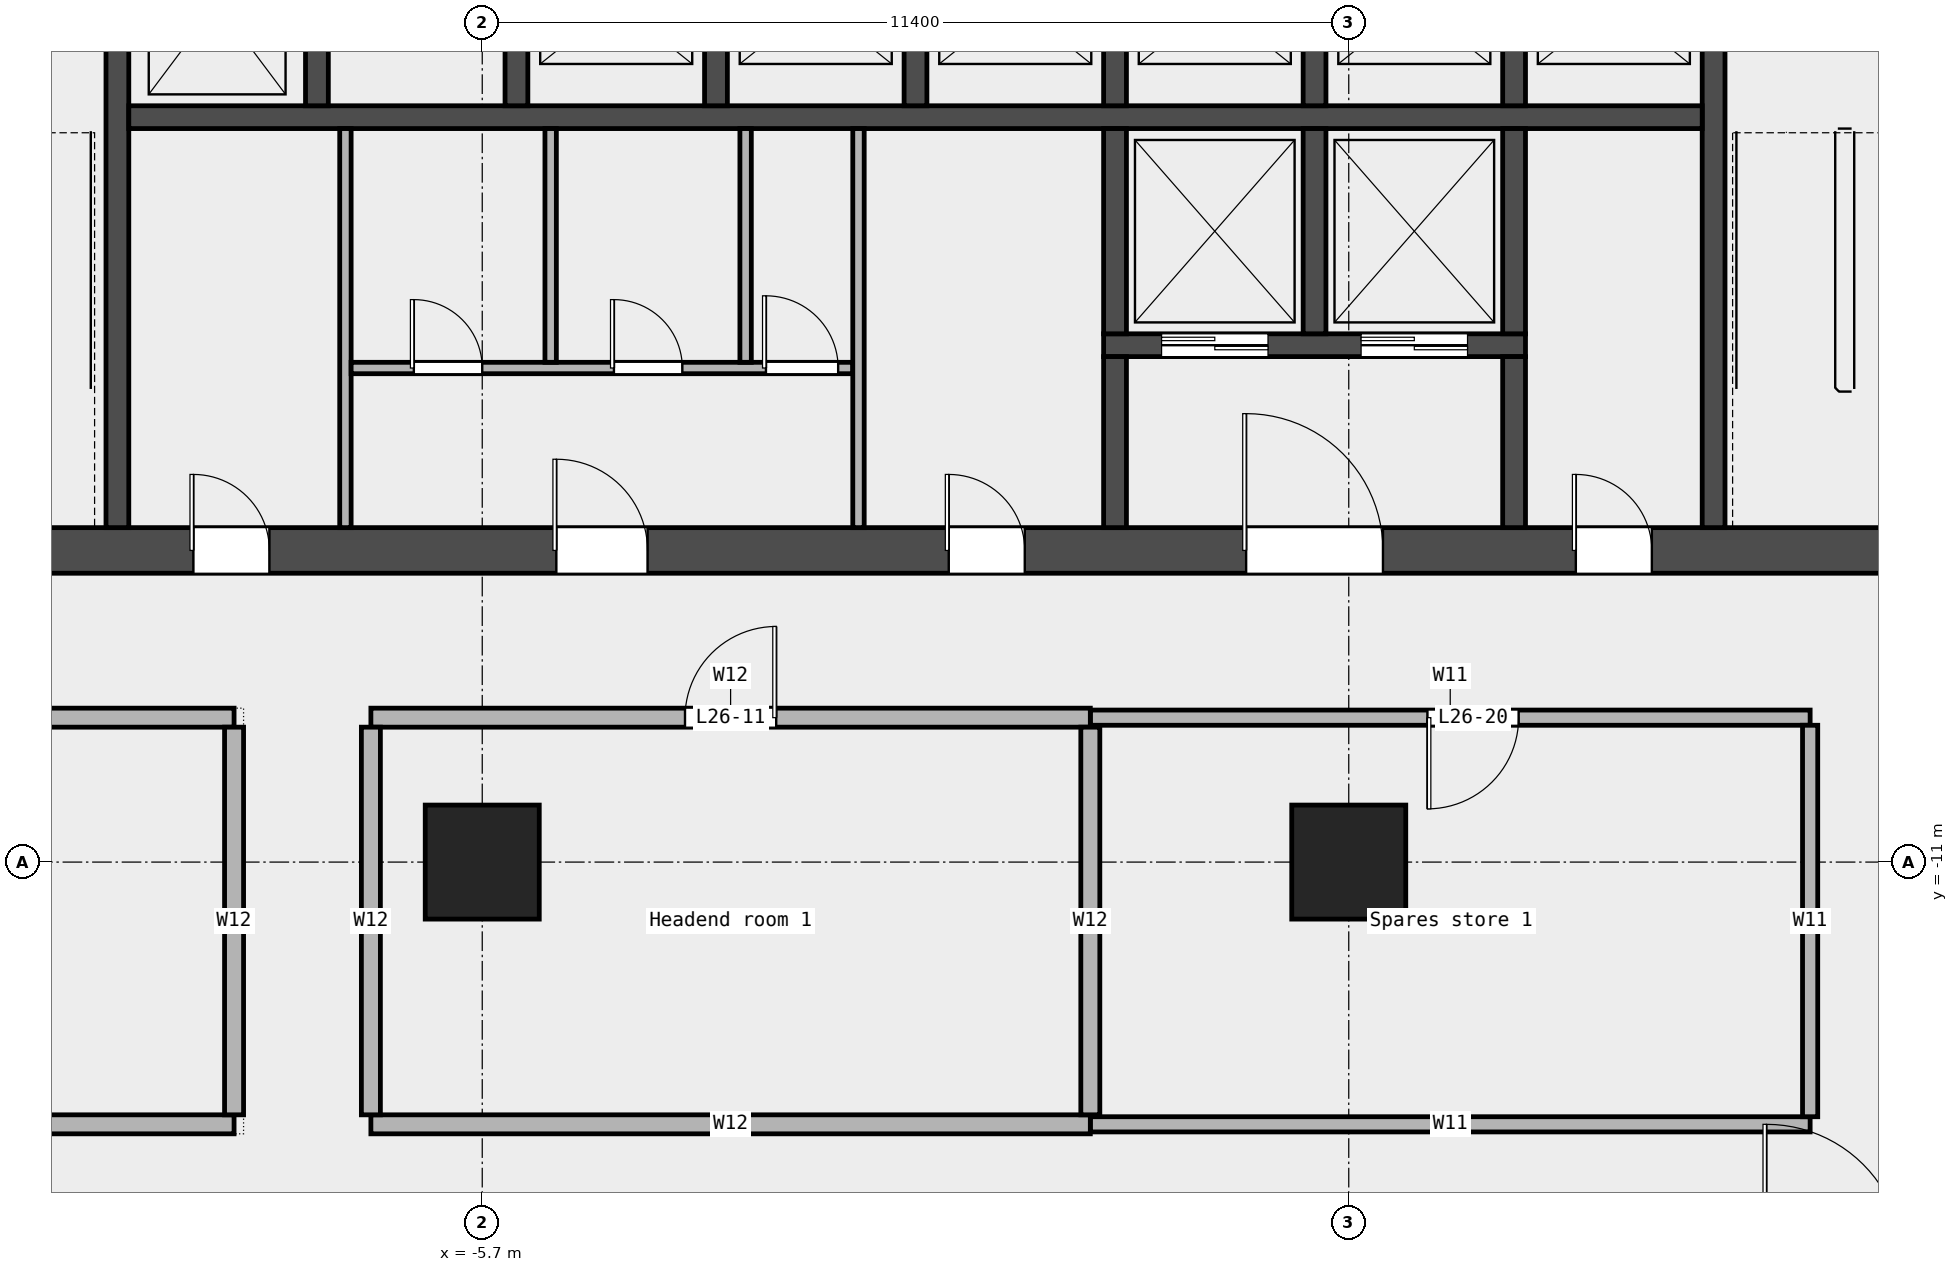
"""IFC4 building model, lengths in metres.
Left out: names, types, materials, properties, quantities, classifications, styles, units other than length and angle.
Written with IfcOpenShell. Run it as: python <this file> out.ifc"""

import sys

from ifc_helpers import new_model, si_unit, direction, frame, frame_2d, origin, origin_2d, place, context, subcontext, project, spatial, rectangle, extrude, element, fill, save


model = new_model("IFC4")
c1 = context("Model", 3, precision=1e-05, world=origin(), true_north=direction((0.0, 1.0)))
c2 = subcontext(c1, "Body", "Model", "MODEL_VIEW")
j1 = project(units=[si_unit("LENGTHUNIT", "METRE"), si_unit("PLANEANGLEUNIT", "RADIAN")], contexts=[c1])
p1 = place(None, origin())
s1 = spatial("IfcSite", under=j1, at=p1, CompositionType="ELEMENT")
p2 = place(p1, origin())
s2 = spatial("IfcBuilding", under=s1, at=p2, CompositionType="ELEMENT")
p3 = place(p2, frame((0.0, 0.0, 130.6)))
s3 = spatial("IfcBuildingStorey", under=s2, at=p3, CompositionType="ELEMENT", Elevation=130.6)
for number, where, z_axis, x_axis in (
    (1, (-5.7, -11.0, 0.0), (0.0, 0.0, 1.0), (1.0, 0.0, 0.0)),
    (2, (5.7, -11.0, 0.0), (0.0, 0.0, 1.0), (1.0, 0.0, 0.0)),
):
    element("IfcColumn", number, at=place(p3, frame(where, z_axis=z_axis, x_axis=x_axis)), inside=s3, PredefinedType="COLUMN", context=c2, shape_type="SweptSolid", body=[
        extrude(rectangle(XDim=1.5, YDim=1.5, at=origin_2d()), origin(), (0.0, 0.0, 1.0), 4.05),
    ])
p4 = place(p3, frame((2.3, -14.45, 0.0), z_axis=(0.0, 0.0, 1.0), x_axis=(1.0, 0.0, 0.0)))
e3 = element("IfcWall", 3, at=p4, inside=s3, PredefinedType="PARTITIONING", context=c2, shape_type="SweptSolid", body=[
    extrude(rectangle(XDim=9.47, YDim=0.2, at=frame_2d((4.735, 0.0))), origin(), (0.0, 0.0, 1.0), 4.05),
])
p5 = place(p3, frame((-15.9, -14.45, 0.0), z_axis=(0.0, 0.0, 1.0), x_axis=(1.0, 0.0, 0.0)))
e4 = element("IfcWall", 4, at=p5, inside=s3, PredefinedType="PARTITIONING", context=c2, shape_type="SweptSolid", body=[
    extrude(rectangle(XDim=6.935, YDim=0.25, at=frame_2d((3.467, 0.0))), origin(), (0.0, 0.0, 1.0), 4.05),
])
p6 = place(p3, frame((-7.165, -14.45, 0.0), z_axis=(0.0, 0.0, 1.0), x_axis=(1.0, 0.0, 0.0)))
e5 = element("IfcWall", 5, at=p6, inside=s3, PredefinedType="PARTITIONING", context=c2, shape_type="SweptSolid", body=[
    extrude(rectangle(XDim=9.465, YDim=0.25, at=frame_2d((4.732, 0.0))), origin(), (0.0, 0.0, 1.0), 4.05),
])
p7 = place(p3, frame((2.3, -9.1, 0.0), z_axis=(0.0, 0.0, 1.0), x_axis=(1.0, 0.0, 0.0)))
e6 = element("IfcWall", 6, at=p7, inside=s3, PredefinedType="PARTITIONING", context=c2, shape_type="SweptSolid", body=[
    extrude(rectangle(XDim=9.47, YDim=0.2, at=frame_2d((4.735, 0.0))), origin(), (0.0, 0.0, 1.0), 4.05),
])
p8 = place(p7, frame((4.435, 0.0, 0.0)))
e7 = element("IfcOpeningElement", 7, at=p8, cuts=e6, PredefinedType="OPENING", context=c2, shape_type="SweptSolid", body=[
    extrude(rectangle(XDim=1.2, YDim=2.1, at=frame_2d((0.6, 1.05))), frame((0.0, 0.112, 0.0), z_axis=(0.0, -1.0, 0.0), x_axis=(1.0, 0.0, 0.0)), (0.0, 0.0, 1.0), 0.224),
])
p9 = place(p3, frame((-15.9, -9.1, 0.0), z_axis=(0.0, 0.0, 1.0), x_axis=(1.0, 0.0, 0.0)))
e8 = element("IfcWall", 8, at=p9, inside=s3, PredefinedType="PARTITIONING", context=c2, shape_type="SweptSolid", body=[
    extrude(rectangle(XDim=6.935, YDim=0.25, at=frame_2d((3.467, 0.0))), origin(), (0.0, 0.0, 1.0), 4.05),
])
p10 = place(p9, frame((3.018, 0.0, 0.0)))
e9 = element("IfcOpeningElement", 9, at=p10, cuts=e8, PredefinedType="OPENING", context=c2, shape_type="SweptSolid", body=[
    extrude(rectangle(XDim=0.9, YDim=2.1, at=frame_2d((0.45, 1.05))), frame((0.0, 0.137, 0.0), z_axis=(0.0, -1.0, 0.0), x_axis=(1.0, 0.0, 0.0)), (0.0, 0.0, 1.0), 0.274),
])
p11 = place(p3, frame((-7.165, -9.1, 0.0), z_axis=(0.0, 0.0, 1.0), x_axis=(1.0, 0.0, 0.0)))
e10 = element("IfcWall", 10, at=p11, inside=s3, PredefinedType="PARTITIONING", context=c2, shape_type="SweptSolid", body=[
    extrude(rectangle(XDim=9.465, YDim=0.25, at=frame_2d((4.732, 0.0))), origin(), (0.0, 0.0, 1.0), 4.05),
])
p12 = place(p11, frame((4.133, 0.0, 0.0)))
e11 = element("IfcOpeningElement", 11, at=p12, cuts=e10, PredefinedType="OPENING", context=c2, shape_type="SweptSolid", body=[
    extrude(rectangle(XDim=1.2, YDim=2.1, at=frame_2d((0.6, 1.05))), frame((0.0, 0.137, 0.0), z_axis=(0.0, -1.0, 0.0), x_axis=(1.0, 0.0, 0.0)), (0.0, 0.0, 1.0), 0.274),
])
for number, where, z_axis, x_axis in (
    (12, (-8.965, -14.325, 0.0), (0.0, 0.0, 1.0), (0.0, 1.0, 0.0)),
    (13, (-7.165, -14.325, 0.0), (0.0, 0.0, 1.0), (0.0, 1.0, 0.0)),
    (14, (2.3, -14.325, 0.0), (0.0, 0.0, 1.0), (0.0, 1.0, 0.0)),
):
    element("IfcWall", number, at=place(p3, frame(where, z_axis=z_axis, x_axis=x_axis)), inside=s3, PredefinedType="PARTITIONING", context=c2, shape_type="SweptSolid", body=[
        extrude(rectangle(XDim=5.1, YDim=0.25, at=frame_2d((2.55, 0.0))), origin(), (0.0, 0.0, 1.0), 4.05),
    ])
p13 = place(p3, frame((11.77, -14.35, 0.0), z_axis=(0.0, 0.0, 1.0), x_axis=(0.0, 1.0, 0.0)))
e15 = element("IfcWall", 15, at=p13, inside=s3, PredefinedType="PARTITIONING", context=c2, shape_type="SweptSolid", body=[
    extrude(rectangle(XDim=5.15, YDim=0.2, at=frame_2d((2.575, 0.0))), origin(), (0.0, 0.0, 1.0), 4.05),
])
p14 = place(p3, frame((-14.4, -6.9, 0.0), z_axis=(0.0, 0.0, 1.0), x_axis=(1.0, 0.0, 0.0)))
e16 = element("IfcWall", 16, at=p14, inside=s3, PredefinedType="SHEAR", context=c2, shape_type="SweptSolid", body=[
    extrude(rectangle(XDim=28.8, YDim=0.6, at=frame_2d((14.4, 0.0))), origin(), (0.0, 0.0, 1.0), 4.2),
])
p15 = place(p14, frame((4.9, 0.0, 0.0)))
e17 = element("IfcOpeningElement", 17, at=p15, cuts=e16, PredefinedType="OPENING", context=c2, shape_type="SweptSolid", body=[
    extrude(rectangle(XDim=1.0, YDim=2.1, at=frame_2d((0.5, 1.05))), frame((0.0, 0.312, 0.0), z_axis=(0.0, -1.0, 0.0), x_axis=(1.0, 0.0, 0.0)), (0.0, 0.0, 1.0), 0.624),
])
p16 = place(p14, frame((9.675, 0.0, 0.0)))
e18 = element("IfcOpeningElement", 18, at=p16, cuts=e16, PredefinedType="OPENING", context=c2, shape_type="SweptSolid", body=[
    extrude(rectangle(XDim=1.2, YDim=2.1, at=frame_2d((0.6, 1.05))), frame((0.0, 0.312, 0.0), z_axis=(0.0, -1.0, 0.0), x_axis=(1.0, 0.0, 0.0)), (0.0, 0.0, 1.0), 0.624),
])
p17 = place(p14, frame((14.837, 0.0, 0.0)))
e19 = element("IfcOpeningElement", 19, at=p17, cuts=e16, PredefinedType="OPENING", context=c2, shape_type="SweptSolid", body=[
    extrude(rectangle(XDim=1.0, YDim=2.1, at=frame_2d((0.5, 1.05))), frame((0.0, 0.312, 0.0), z_axis=(0.0, -1.0, 0.0), x_axis=(1.0, 0.0, 0.0)), (0.0, 0.0, 1.0), 0.624),
])
p18 = place(p14, frame((18.75, 0.0, 0.0)))
e20 = element("IfcOpeningElement", 20, at=p18, cuts=e16, PredefinedType="OPENING", context=c2, shape_type="SweptSolid", body=[
    extrude(rectangle(XDim=1.8, YDim=2.1, at=frame_2d((0.9, 1.05))), frame((0.0, 0.312, 0.0), z_axis=(0.0, -1.0, 0.0), x_axis=(1.0, 0.0, 0.0)), (0.0, 0.0, 1.0), 0.624),
])
p19 = place(p14, frame((23.087, 0.0, 0.0)))
e21 = element("IfcOpeningElement", 21, at=p19, cuts=e16, PredefinedType="OPENING", context=c2, shape_type="SweptSolid", body=[
    extrude(rectangle(XDim=1.0, YDim=2.1, at=frame_2d((0.5, 1.05))), frame((0.0, 0.312, 0.0), z_axis=(0.0, -1.0, 0.0), x_axis=(1.0, 0.0, 0.0)), (0.0, 0.0, 1.0), 0.624),
])
for number, where, z_axis, x_axis in (
    (22, (-10.5, -6.6, 0.0), (0.0, 0.0, 1.0), (0.0, 1.0, 0.0)),
    (23, (10.5, -6.6, 0.0), (0.0, 0.0, 1.0), (0.0, 1.0, 0.0)),
):
    element("IfcWall", number, at=place(p3, frame(where, z_axis=z_axis, x_axis=x_axis)), inside=s3, PredefinedType="SHEAR", context=c2, shape_type="SweptSolid", body=[
        extrude(rectangle(XDim=8.55, YDim=0.3, at=frame_2d((4.275, 0.0))), origin(), (0.0, 0.0, 1.0), 4.2),
    ])
p20 = place(p3, frame((-10.35, -1.2, 0.0), z_axis=(0.0, 0.0, 1.0), x_axis=(1.0, 0.0, 0.0)))
e24 = element("IfcWall", 24, at=p20, inside=s3, PredefinedType="SOLIDWALL", context=c2, shape_type="SweptSolid", body=[
    extrude(rectangle(XDim=20.7, YDim=0.3, at=frame_2d((10.35, 0.0))), origin(), (0.0, 0.0, 1.0), 4.2),
])
for number, where, z_axis, x_axis in (
    (25, (-7.875, -1.05, 0.0), (0.0, 0.0, 1.0), (0.0, 1.0, 0.0)),
    (26, (-5.25, -1.05, 0.0), (0.0, 0.0, 1.0), (0.0, 1.0, 0.0)),
    (27, (-2.625, -1.05, 0.0), (0.0, 0.0, 1.0), (0.0, 1.0, 0.0)),
    (28, (0.0, -1.05, 0.0), (0.0, 0.0, 1.0), (0.0, 1.0, 0.0)),
    (29, (2.625, -1.05, 0.0), (0.0, 0.0, 1.0), (0.0, 1.0, 0.0)),
    (30, (5.25, -1.05, 0.0), (0.0, 0.0, 1.0), (0.0, 1.0, 0.0)),
    (31, (7.875, -1.05, 0.0), (0.0, 0.0, 1.0), (0.0, 1.0, 0.0)),
):
    element("IfcWall", number, at=place(p3, frame(where, z_axis=z_axis, x_axis=x_axis)), inside=s3, PredefinedType="SOLIDWALL", context=c2, shape_type="SweptSolid", body=[
        extrude(rectangle(XDim=2.7, YDim=0.3, at=frame_2d((1.35, 0.0))), origin(), (0.0, 0.0, 1.0), 4.2),
    ])
p21 = place(p3, frame((2.475, -4.2, 0.0), z_axis=(0.0, 0.0, 1.0), x_axis=(1.0, 0.0, 0.0)))
e32 = element("IfcWall", 32, at=p21, inside=s3, PredefinedType="SOLIDWALL", context=c2, shape_type="SweptSolid", body=[
    extrude(rectangle(XDim=5.55, YDim=0.3, at=frame_2d((2.775, 0.0))), origin(), (0.0, 0.0, 1.0), 4.2),
])
p22 = place(p21, frame((0.762, 0.0, 0.0)))
e33 = element("IfcOpeningElement", 33, at=p22, cuts=e32, PredefinedType="OPENING", context=c2, shape_type="SweptSolid", body=[
    extrude(rectangle(XDim=1.4, YDim=2.1, at=frame_2d((0.7, 1.05))), frame((0.0, 0.162, 0.0), z_axis=(0.0, -1.0, 0.0), x_axis=(1.0, 0.0, 0.0)), (0.0, 0.0, 1.0), 0.324),
])
p23 = place(p21, frame((3.387, 0.0, 0.0)))
e34 = element("IfcOpeningElement", 34, at=p23, cuts=e32, PredefinedType="OPENING", context=c2, shape_type="SweptSolid", body=[
    extrude(rectangle(XDim=1.4, YDim=2.1, at=frame_2d((0.7, 1.05))), frame((0.0, 0.162, 0.0), z_axis=(0.0, -1.0, 0.0), x_axis=(1.0, 0.0, 0.0)), (0.0, 0.0, 1.0), 0.324),
])
p24 = place(p3, frame((2.625, -4.05, 0.0), z_axis=(0.0, 0.0, 1.0), x_axis=(0.0, 1.0, 0.0)))
e35 = element("IfcWall", 35, at=p24, inside=s3, PredefinedType="SOLIDWALL", context=c2, shape_type="SweptSolid", body=[
    extrude(rectangle(XDim=2.7, YDim=0.3, at=frame_2d((1.35, 0.0))), origin(), (0.0, 0.0, 1.0), 4.2),
])
p25 = place(p3, frame((2.625, -6.6, 0.0), z_axis=(0.0, 0.0, 1.0), x_axis=(0.0, 1.0, 0.0)))
e36 = element("IfcWall", 36, at=p25, inside=s3, PredefinedType="SOLIDWALL", context=c2, shape_type="SweptSolid", body=[
    extrude(rectangle(XDim=2.25, YDim=0.3, at=frame_2d((1.125, 0.0))), origin(), (0.0, 0.0, 1.0), 4.2),
])
for number, where, z_axis, x_axis in (
    (37, (5.25, -4.05, 0.0), (0.0, 0.0, 1.0), (0.0, 1.0, 0.0)),
    (38, (7.875, -4.05, 0.0), (0.0, 0.0, 1.0), (0.0, 1.0, 0.0)),
):
    element("IfcWall", number, at=place(p3, frame(where, z_axis=z_axis, x_axis=x_axis)), inside=s3, PredefinedType="SOLIDWALL", context=c2, shape_type="SweptSolid", body=[
        extrude(rectangle(XDim=2.7, YDim=0.3, at=frame_2d((1.35, 0.0))), origin(), (0.0, 0.0, 1.0), 4.2),
    ])
p26 = place(p3, frame((7.875, -6.6, 0.0), z_axis=(0.0, 0.0, 1.0), x_axis=(0.0, 1.0, 0.0)))
e39 = element("IfcWall", 39, at=p26, inside=s3, PredefinedType="SOLIDWALL", context=c2, shape_type="SweptSolid", body=[
    extrude(rectangle(XDim=2.25, YDim=0.3, at=frame_2d((1.125, 0.0))), origin(), (0.0, 0.0, 1.0), 4.2),
])
p27 = place(p3, frame((-7.5, -6.6, 0.0), z_axis=(0.0, 0.0, 1.0), x_axis=(0.0, 1.0, 0.0)))
e40 = element("IfcWall", 40, at=p27, inside=s3, PredefinedType="PARTITIONING", context=c2, shape_type="SweptSolid", body=[
    extrude(rectangle(XDim=5.25, YDim=0.15, at=frame_2d((2.625, 0.0))), origin(), (0.0, 0.0, 1.0), 4.2),
])
p28 = place(p3, frame((-7.425, -4.5, 0.0), z_axis=(0.0, 0.0, 1.0), x_axis=(1.0, 0.0, 0.0)))
e41 = element("IfcWall", 41, at=p28, inside=s3, PredefinedType="PARTITIONING", context=c2, shape_type="SweptSolid", body=[
    extrude(rectangle(XDim=6.6, YDim=0.15, at=frame_2d((3.3, 0.0))), origin(), (0.0, 0.0, 1.0), 4.2),
])
p29 = place(p28, frame((0.825, 0.0, 0.0)))
e42 = element("IfcOpeningElement", 42, at=p29, cuts=e41, PredefinedType="OPENING", context=c2, shape_type="SweptSolid", body=[
    extrude(rectangle(XDim=0.9, YDim=2.1, at=frame_2d((0.45, 1.05))), frame((0.0, 0.087, 0.0), z_axis=(0.0, -1.0, 0.0), x_axis=(1.0, 0.0, 0.0)), (0.0, 0.0, 1.0), 0.174),
])
p30 = place(p28, frame((3.458, 0.0, 0.0)))
e43 = element("IfcOpeningElement", 43, at=p30, cuts=e41, PredefinedType="OPENING", context=c2, shape_type="SweptSolid", body=[
    extrude(rectangle(XDim=0.9, YDim=2.1, at=frame_2d((0.45, 1.05))), frame((0.0, 0.087, 0.0), z_axis=(0.0, -1.0, 0.0), x_axis=(1.0, 0.0, 0.0)), (0.0, 0.0, 1.0), 0.174),
])
p31 = place(p28, frame((5.458, 0.0, 0.0)))
e44 = element("IfcOpeningElement", 44, at=p31, cuts=e41, PredefinedType="OPENING", context=c2, shape_type="SweptSolid", body=[
    extrude(rectangle(XDim=0.95, YDim=2.1, at=frame_2d((0.475, 1.05))), frame((0.0, 0.087, 0.0), z_axis=(0.0, -1.0, 0.0), x_axis=(1.0, 0.0, 0.0)), (0.0, 0.0, 1.0), 0.174),
])
for number, where, z_axis, x_axis in (
    (45, (-4.8, -4.425, 0.0), (0.0, 0.0, 1.0), (0.0, 1.0, 0.0)),
    (46, (-2.235, -4.425, 0.0), (0.0, 0.0, 1.0), (0.0, 1.0, 0.0)),
):
    element("IfcWall", number, at=place(p3, frame(where, z_axis=z_axis, x_axis=x_axis)), inside=s3, PredefinedType="PARTITIONING", context=c2, shape_type="SweptSolid", body=[
        extrude(rectangle(XDim=3.075, YDim=0.15, at=frame_2d((1.538, 0.0))), origin(), (0.0, 0.0, 1.0), 4.2),
    ])
p32 = place(p3, frame((-0.75, -6.6, 0.0), z_axis=(0.0, 0.0, 1.0), x_axis=(0.0, 1.0, 0.0)))
e47 = element("IfcWall", 47, at=p32, inside=s3, PredefinedType="PARTITIONING", context=c2, shape_type="SweptSolid", body=[
    extrude(rectangle(XDim=5.25, YDim=0.15, at=frame_2d((2.625, 0.0))), origin(), (0.0, 0.0, 1.0), 4.2),
])
p33 = place(p12, origin())
e48 = element("IfcDoor", 48, at=p33, inside=s3, OperationType="SINGLE_SWING_RIGHT", PredefinedType="DOOR", context=c2, shape_type="SweptSolid", body=[
    extrude(rectangle(XDim=1.2, YDim=2.1, at=frame_2d((0.6, 1.05))), frame((0.0, 0.025, 0.0), z_axis=(0.0, -1.0, 0.0), x_axis=(1.0, 0.0, 0.0)), (0.0, 0.0, 1.0), 0.05),
])
fill(e11, e48)
p34 = place(p8, origin())
e49 = element("IfcDoor", 49, at=p34, inside=s3, OperationType="SINGLE_SWING_RIGHT", PredefinedType="DOOR", context=c2, shape_type="SweptSolid", body=[
    extrude(rectangle(XDim=1.2, YDim=2.1, at=frame_2d((0.6, 1.05))), frame((0.0, 0.025, 0.0), z_axis=(0.0, -1.0, 0.0), x_axis=(1.0, 0.0, 0.0)), (0.0, 0.0, 1.0), 0.05),
])
fill(e7, e49)
p35 = place(p22, origin())
e50 = element("IfcDoor", 50, at=p35, inside=s3, OperationType="DOUBLE_DOOR_SLIDING", PredefinedType="DOOR", context=c2, shape_type="SweptSolid", body=[
    extrude(rectangle(XDim=1.4, YDim=2.1, at=frame_2d((0.7, 1.05))), frame((0.0, 0.025, 0.0), z_axis=(0.0, -1.0, 0.0), x_axis=(1.0, 0.0, 0.0)), (0.0, 0.0, 1.0), 0.05),
])
fill(e33, e50)
p36 = place(p23, origin())
e51 = element("IfcDoor", 51, at=p36, inside=s3, OperationType="DOUBLE_DOOR_SLIDING", PredefinedType="DOOR", context=c2, shape_type="SweptSolid", body=[
    extrude(rectangle(XDim=1.4, YDim=2.1, at=frame_2d((0.7, 1.05))), frame((0.0, 0.025, 0.0), z_axis=(0.0, -1.0, 0.0), x_axis=(1.0, 0.0, 0.0)), (0.0, 0.0, 1.0), 0.05),
])
fill(e34, e51)
p37 = place(p15, origin())
e52 = element("IfcDoor", 52, at=p37, inside=s3, OperationType="SINGLE_SWING_LEFT", PredefinedType="DOOR", context=c2, shape_type="SweptSolid", body=[
    extrude(rectangle(XDim=1.0, YDim=2.1, at=frame_2d((0.5, 1.05))), frame((0.0, 0.025, 0.0), z_axis=(0.0, -1.0, 0.0), x_axis=(1.0, 0.0, 0.0)), (0.0, 0.0, 1.0), 0.05),
])
fill(e17, e52)
p38 = place(p16, origin())
e53 = element("IfcDoor", 53, at=p38, inside=s3, OperationType="SINGLE_SWING_LEFT", PredefinedType="DOOR", context=c2, shape_type="SweptSolid", body=[
    extrude(rectangle(XDim=1.2, YDim=2.1, at=frame_2d((0.6, 1.05))), frame((0.0, 0.025, 0.0), z_axis=(0.0, -1.0, 0.0), x_axis=(1.0, 0.0, 0.0)), (0.0, 0.0, 1.0), 0.05),
])
fill(e18, e53)
p39 = place(p29, origin())
e54 = element("IfcDoor", 54, at=p39, inside=s3, OperationType="SINGLE_SWING_LEFT", PredefinedType="DOOR", context=c2, shape_type="SweptSolid", body=[
    extrude(rectangle(XDim=0.9, YDim=2.1, at=frame_2d((0.45, 1.05))), frame((0.0, 0.025, 0.0), z_axis=(0.0, -1.0, 0.0), x_axis=(1.0, 0.0, 0.0)), (0.0, 0.0, 1.0), 0.05),
])
fill(e42, e54)
p40 = place(p30, origin())
e55 = element("IfcDoor", 55, at=p40, inside=s3, OperationType="SINGLE_SWING_LEFT", PredefinedType="DOOR", context=c2, shape_type="SweptSolid", body=[
    extrude(rectangle(XDim=0.9, YDim=2.1, at=frame_2d((0.45, 1.05))), frame((0.0, 0.025, 0.0), z_axis=(0.0, -1.0, 0.0), x_axis=(1.0, 0.0, 0.0)), (0.0, 0.0, 1.0), 0.05),
])
fill(e43, e55)
p41 = place(p31, origin())
e56 = element("IfcDoor", 56, at=p41, inside=s3, OperationType="SINGLE_SWING_LEFT", PredefinedType="DOOR", context=c2, shape_type="SweptSolid", body=[
    extrude(rectangle(XDim=0.95, YDim=2.1, at=frame_2d((0.475, 1.05))), frame((0.0, 0.025, 0.0), z_axis=(0.0, -1.0, 0.0), x_axis=(1.0, 0.0, 0.0)), (0.0, 0.0, 1.0), 0.05),
])
fill(e44, e56)
p42 = place(p17, origin())
e57 = element("IfcDoor", 57, at=p42, inside=s3, OperationType="SINGLE_SWING_LEFT", PredefinedType="DOOR", context=c2, shape_type="SweptSolid", body=[
    extrude(rectangle(XDim=1.0, YDim=2.1, at=frame_2d((0.5, 1.05))), frame((0.0, 0.025, 0.0), z_axis=(0.0, -1.0, 0.0), x_axis=(1.0, 0.0, 0.0)), (0.0, 0.0, 1.0), 0.05),
])
fill(e19, e57)
p43 = place(p18, origin())
e58 = element("IfcDoor", 58, at=p43, inside=s3, OperationType="DOUBLE_DOOR_SINGLE_SWING", PredefinedType="DOOR", context=c2, shape_type="SweptSolid", body=[
    extrude(rectangle(XDim=1.8, YDim=2.1, at=frame_2d((0.9, 1.05))), frame((0.0, 0.025, 0.0), z_axis=(0.0, -1.0, 0.0), x_axis=(1.0, 0.0, 0.0)), (0.0, 0.0, 1.0), 0.05),
])
fill(e20, e58)
p44 = place(p19, origin())
e59 = element("IfcDoor", 59, at=p44, inside=s3, OperationType="SINGLE_SWING_LEFT", PredefinedType="DOOR", context=c2, shape_type="SweptSolid", body=[
    extrude(rectangle(XDim=1.0, YDim=2.1, at=frame_2d((0.5, 1.05))), frame((0.0, 0.025, 0.0), z_axis=(0.0, -1.0, 0.0), x_axis=(1.0, 0.0, 0.0)), (0.0, 0.0, 1.0), 0.05),
])
fill(e21, e59)
save(model, sys.argv[1])
